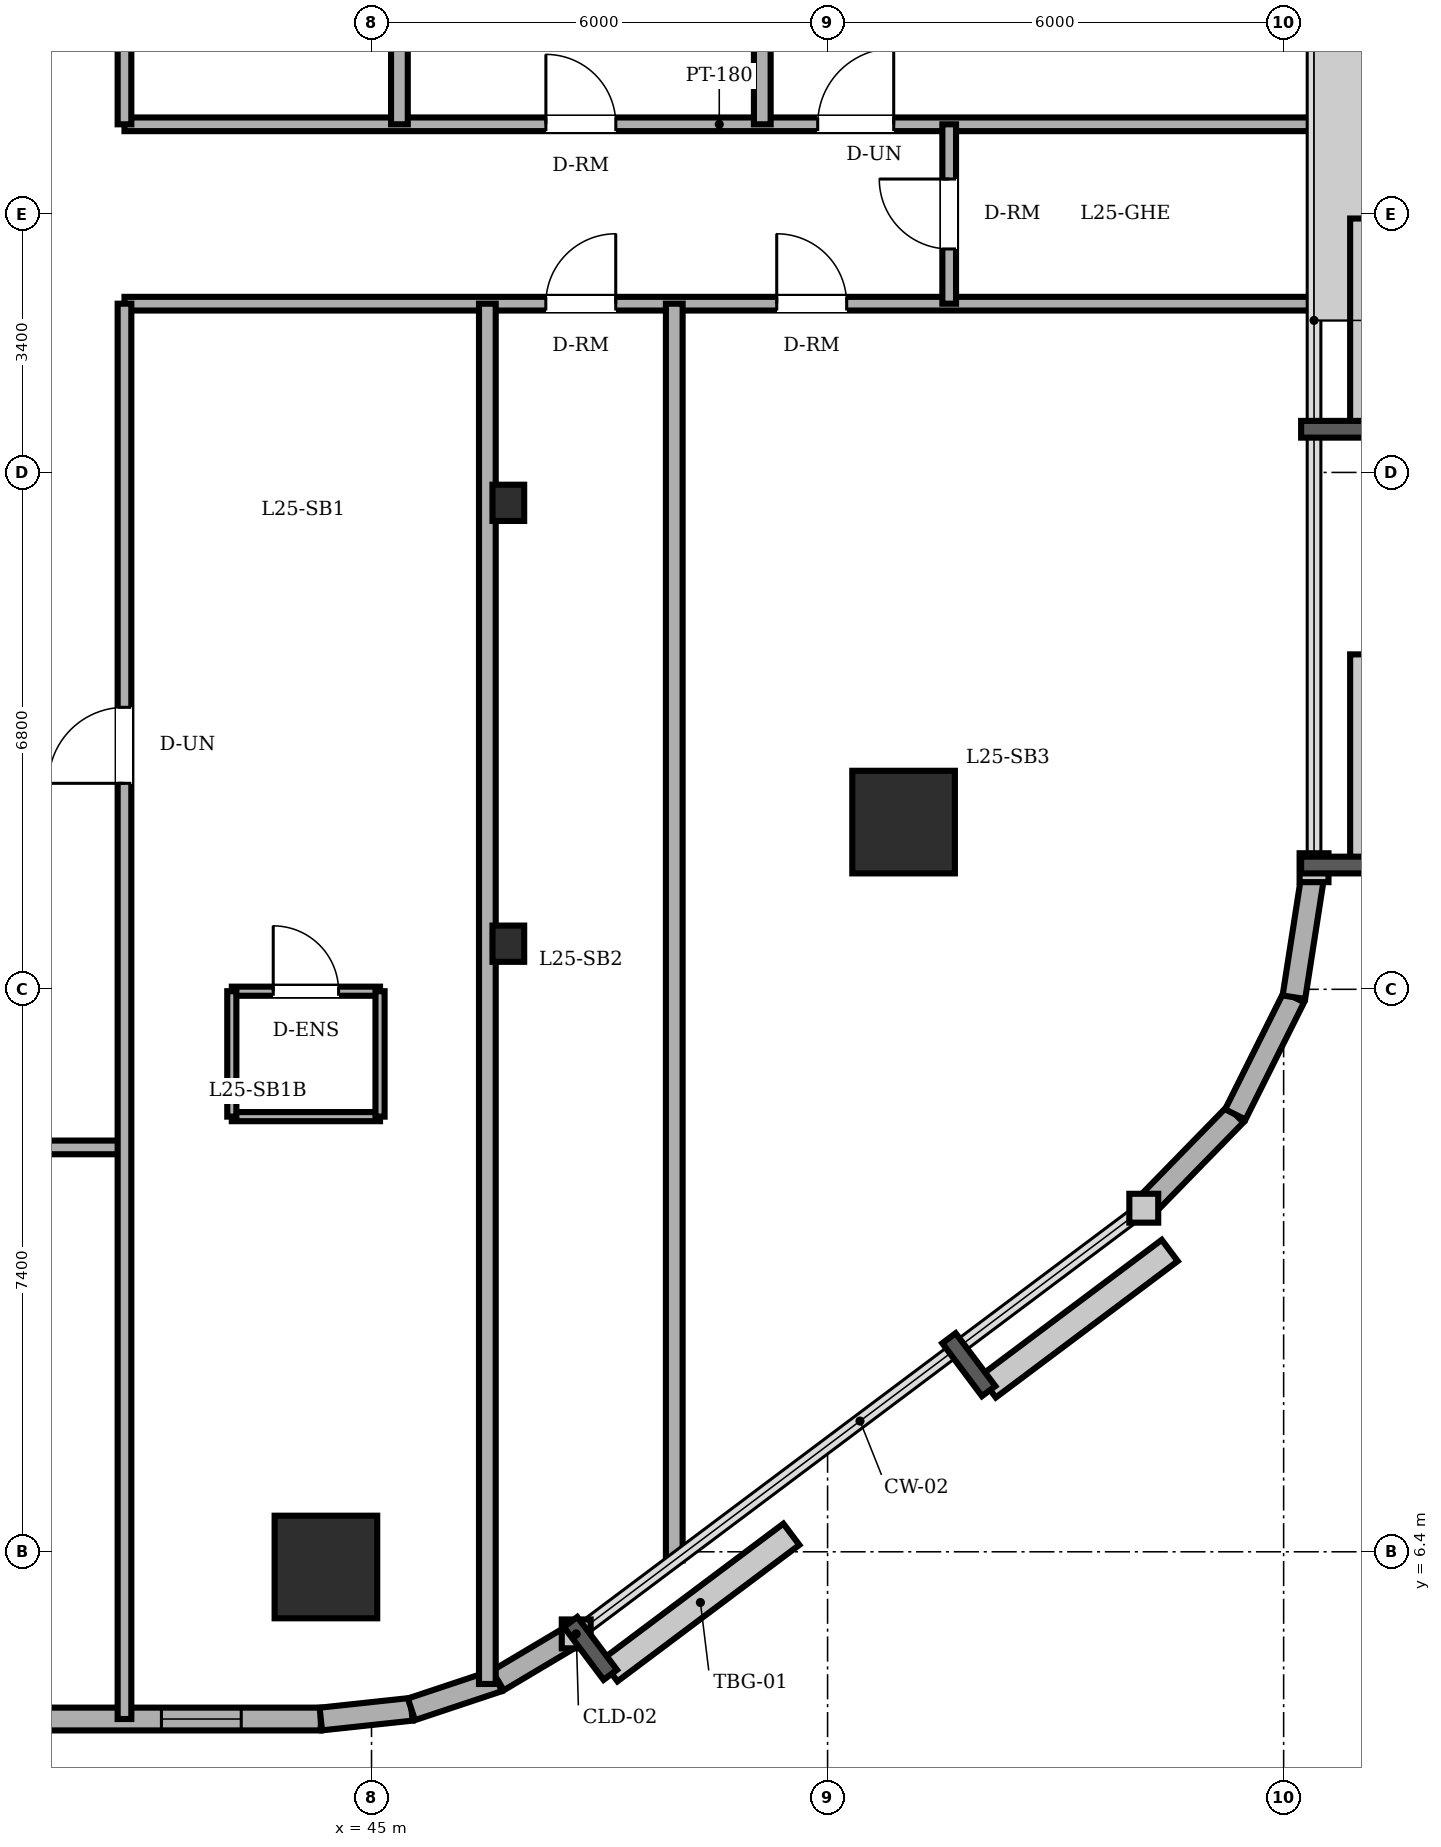
"""IFC4 building model, lengths in metres.
Left out: names, types, materials, properties, quantities, classifications, styles, units other than length and angle.
Written with IfcOpenShell. Run it as: python <this file> out.ifc"""

import sys

from ifc_helpers import new_model, si_unit, direction, frame, frame_2d, origin, origin_2d, place, context, subcontext, project, spatial, rectangle, circle, i_section, extrude, element, fill, save


model = new_model("IFC4")
c1 = context("Model", 3, precision=1e-05, world=origin(), true_north=direction((0.0, 1.0)))
c2 = subcontext(c1, "Body", "Model", "MODEL_VIEW")
j1 = project(units=[si_unit("LENGTHUNIT", "METRE"), si_unit("PLANEANGLEUNIT", "RADIAN")], contexts=[c1])
p1 = place(None, origin())
s1 = spatial("IfcSite", under=j1, at=p1, CompositionType="ELEMENT")
p2 = place(p1, origin())
s2 = spatial("IfcBuilding", under=s1, at=p2, CompositionType="ELEMENT")
p3 = place(p2, frame((0.0, 0.0, 97.1)))
s3 = spatial("IfcBuildingStorey", under=s2, at=p3, CompositionType="ELEMENT", Elevation=97.1)
for number, where, z_axis, x_axis in (
    (1, (44.4, 6.2, 0.0), (0.0, 0.0, 1.0), (1.0, 0.0, 0.0)),
    (2, (52.0, 16.0, 0.0), (0.0, 0.0, 1.0), (1.0, 0.0, 0.0)),
):
    element("IfcColumn", number, at=place(p3, frame(where, z_axis=z_axis, x_axis=x_axis)), inside=s3, PredefinedType="COLUMN", context=c2, shape_type="SweptSolid", body=[
        extrude(circle(Radius=0.675, at=origin_2d()), origin(), (0.0, 0.0, 1.0), 3.6),
    ])
for number, where, z_axis, x_axis in (
    (3, (46.8, 14.4, 0.0), (0.0, 0.0, 1.0), (1.0, 0.0, 0.0)),
    (4, (46.8, 20.2, 0.0), (0.0, 0.0, 1.0), (1.0, 0.0, 0.0)),
):
    element("IfcColumn", number, at=place(p3, frame(where, z_axis=z_axis, x_axis=x_axis)), inside=s3, PredefinedType="COLUMN", context=c2, shape_type="SweptSolid", body=[
        extrude(i_section(OverallWidth=0.417, OverallDepth=0.477, WebThickness=0.036, FlangeThickness=0.057, FilletRadius=0.015, at=origin_2d()), origin(), (0.0, 0.0, 1.0), 3.6),
    ])
p4 = place(p3, frame((14.4, 4.2, 0.0), z_axis=(0.0, 0.0, 1.0), x_axis=(1.0, 0.0, 0.0)))
e5 = element("IfcWall", 5, at=p4, inside=s3, PredefinedType="SOLIDWALL", context=c2, shape_type="SweptSolid", body=[
    extrude(rectangle(XDim=29.933, YDim=0.3, at=frame_2d((14.967, 0.0))), origin(), (0.0, 0.0, 1.0), 3.4),
])
p5 = place(p4, frame((3.85, 0.0, 0.0)))
e6 = element("IfcOpeningElement", 6, at=p5, cuts=e5, PredefinedType="OPENING", context=c2, shape_type="SweptSolid", body=[
    extrude(rectangle(XDim=0.95, YDim=2.2, at=frame_2d((0.475, 1.1))), frame((0.0, 0.16, 0.0), z_axis=(0.0, -1.0, 0.0), x_axis=(1.0, 0.0, 0.0)), (0.0, 0.0, 1.0), 0.32),
])
p6 = place(p4, frame((5.158, 0.0, 0.85)))
e7 = element("IfcOpeningElement", 7, at=p6, cuts=e5, PredefinedType="OPENING", context=c2, shape_type="SweptSolid", body=[
    extrude(rectangle(XDim=1.65, YDim=1.55, at=frame_2d((0.825, 0.775))), frame((0.0, 0.16, 0.0), z_axis=(0.0, -1.0, 0.0), x_axis=(1.0, 0.0, 0.0)), (0.0, 0.0, 1.0), 0.32),
])
p7 = place(p4, frame((9.875, 0.0, 0.85)))
e8 = element("IfcOpeningElement", 8, at=p7, cuts=e5, PredefinedType="OPENING", context=c2, shape_type="SweptSolid", body=[
    extrude(rectangle(XDim=1.65, YDim=1.55, at=frame_2d((0.825, 0.775))), frame((0.0, 0.16, 0.0), z_axis=(0.0, -1.0, 0.0), x_axis=(1.0, 0.0, 0.0)), (0.0, 0.0, 1.0), 0.32),
])
p8 = place(p4, frame((16.692, 0.0, 0.85)))
e9 = element("IfcOpeningElement", 9, at=p8, cuts=e5, PredefinedType="OPENING", context=c2, shape_type="SweptSolid", body=[
    extrude(rectangle(XDim=1.65, YDim=1.55, at=frame_2d((0.825, 0.775))), frame((0.0, 0.16, 0.0), z_axis=(0.0, -1.0, 0.0), x_axis=(1.0, 0.0, 0.0)), (0.0, 0.0, 1.0), 0.32),
])
p9 = place(p4, frame((21.608, 0.0, 0.85)))
e10 = element("IfcOpeningElement", 10, at=p9, cuts=e5, PredefinedType="OPENING", context=c2, shape_type="SweptSolid", body=[
    extrude(rectangle(XDim=1.65, YDim=1.55, at=frame_2d((0.825, 0.775))), frame((0.0, 0.16, 0.0), z_axis=(0.0, -1.0, 0.0), x_axis=(1.0, 0.0, 0.0)), (0.0, 0.0, 1.0), 0.32),
])
p10 = place(p4, frame((27.836, 0.0, 0.85)))
e11 = element("IfcOpeningElement", 11, at=p10, cuts=e5, PredefinedType="OPENING", context=c2, shape_type="SweptSolid", body=[
    extrude(rectangle(XDim=1.05, YDim=1.55, at=frame_2d((0.525, 0.775))), frame((0.0, 0.16, 0.0), z_axis=(0.0, -1.0, 0.0), x_axis=(1.0, 0.0, 0.0)), (0.0, 0.0, 1.0), 0.32),
])
p11 = place(p3, frame((44.333, 4.2, 0.0), z_axis=(0.0, 0.0, 1.0), x_axis=(0.994289103787, 0.106720092254, 0.0)))
e12 = element("IfcWall", 12, at=p11, inside=s3, PredefinedType="SOLIDWALL", context=c2, shape_type="SweptSolid", body=[
    extrude(rectangle(XDim=1.199, YDim=0.3, at=frame_2d((0.599, 0.0))), origin(), (0.0, 0.0, 1.0), 3.4),
])
p12 = place(p3, frame((45.525, 4.328, 0.0), z_axis=(0.0, 0.0, 1.0), x_axis=(0.948744332129, 0.316044604847, 0.0)))
e13 = element("IfcWall", 13, at=p12, inside=s3, PredefinedType="SOLIDWALL", context=c2, shape_type="SweptSolid", body=[
    extrude(rectangle(XDim=1.2, YDim=0.3, at=frame_2d((0.6, 0.0))), origin(), (0.0, 0.0, 1.0), 3.4),
])
p13 = place(p3, frame((46.663, 4.707, 0.0), z_axis=(0.0, 0.0, 1.0), x_axis=(0.859320591642, 0.511437308749, 0.0)))
e14 = element("IfcWall", 14, at=p13, inside=s3, PredefinedType="SOLIDWALL", context=c2, shape_type="SweptSolid", body=[
    extrude(rectangle(XDim=1.199, YDim=0.3, at=frame_2d((0.599, 0.0))), origin(), (0.0, 0.0, 1.0), 3.4),
])
for number, where, z_axis, x_axis in (
    (15, (55.16, 10.92, 0.0), (0.0, 0.0, 1.0), (0.698, 0.716, 0.0)),
    (16, (56.364, 12.154, 0.0), (0.0, 0.0, 1.0), (0.447, 0.894, 0.0)),
):
    element("IfcWall", number, at=place(p3, frame(where, z_axis=z_axis, x_axis=x_axis)), inside=s3, PredefinedType="SOLIDWALL", context=c2, shape_type="SweptSolid", body=[
        extrude(rectangle(XDim=1.724, YDim=0.3, at=frame_2d((0.862, 0.0))), origin(), (0.0, 0.0, 1.0), 3.4),
    ])
p14 = place(p3, frame((57.135, 13.696, 0.0), z_axis=(0.0, 0.0, 1.0), x_axis=(0.153620989032, 0.988129845581, 0.0)))
e17 = element("IfcWall", 17, at=p14, inside=s3, PredefinedType="SOLIDWALL", context=c2, shape_type="SweptSolid", body=[
    extrude(rectangle(XDim=1.724, YDim=0.3, at=frame_2d((0.862, 0.0))), origin(), (0.0, 0.0, 1.0), 3.4),
])
p15 = place(p3, frame((43.162, 13.775, 0.0), z_axis=(0.0, 0.0, 1.0), x_axis=(1.0, 0.0, 0.0)))
e18 = element("IfcWall", 18, at=p15, inside=s3, PredefinedType="PARTITIONING", context=c2, shape_type="SweptSolid", body=[
    extrude(rectangle(XDim=1.95, YDim=0.12, at=frame_2d((0.975, 0.0))), origin(), (0.0, 0.0, 1.0), 3.4),
])
p16 = place(p15, frame((0.545, 0.0, 0.0)))
e19 = element("IfcOpeningElement", 19, at=p16, cuts=e18, PredefinedType="OPENING", context=c2, shape_type="SweptSolid", body=[
    extrude(rectangle(XDim=0.86, YDim=2.1, at=frame_2d((0.43, 1.05))), frame((0.0, 0.07, 0.0), z_axis=(0.0, -1.0, 0.0), x_axis=(1.0, 0.0, 0.0)), (0.0, 0.0, 1.0), 0.14),
])
p17 = place(p3, frame((45.112, 12.125, 0.0), z_axis=(0.0, 0.0, 1.0), x_axis=(-1.0, 0.0, 0.0)))
e20 = element("IfcWall", 20, at=p17, inside=s3, PredefinedType="PARTITIONING", context=c2, shape_type="SweptSolid", body=[
    extrude(rectangle(XDim=1.95, YDim=0.12, at=frame_2d((0.975, 0.0))), origin(), (0.0, 0.0, 1.0), 3.4),
])
for number, where, z_axis, x_axis in (
    (21, (43.162, 13.775, 0.0), (0.0, 0.0, 1.0), (0.0, -1.0, 0.0)),
    (22, (45.112, 12.125, 0.0), (0.0, 0.0, 1.0), (0.0, 1.0, 0.0)),
):
    element("IfcWall", number, at=place(p3, frame(where, z_axis=z_axis, x_axis=x_axis)), inside=s3, PredefinedType="PARTITIONING", context=c2, shape_type="SweptSolid", body=[
        extrude(rectangle(XDim=1.65, YDim=0.12, at=frame_2d((0.825, 0.0))), origin(), (0.0, 0.0, 1.0), 3.4),
    ])
p18 = place(p3, frame((8.8, 11.72, 0.0), z_axis=(0.0, 0.0, 1.0), x_axis=(1.0, 0.0, 0.0)))
e23 = element("IfcWall", 23, at=p18, inside=s3, PredefinedType="PARTITIONING", context=c2, shape_type="SweptSolid", body=[
    extrude(rectangle(XDim=32.95, YDim=0.18, at=frame_2d((16.475, 0.0))), origin(), (0.0, 0.0, 1.0), 3.4),
])
p19 = place(p18, frame((15.84, 0.0, 0.0)))
e24 = element("IfcOpeningElement", 24, at=p19, cuts=e23, PredefinedType="OPENING", context=c2, shape_type="SweptSolid", body=[
    extrude(rectangle(XDim=0.92, YDim=2.1, at=frame_2d((0.46, 1.05))), frame((0.0, 0.1, 0.0), z_axis=(0.0, -1.0, 0.0), x_axis=(1.0, 0.0, 0.0)), (0.0, 0.0, 1.0), 0.2),
])
p20 = place(p18, frame((3.101, 0.0, 0.0)))
e25 = element("IfcOpeningElement", 25, at=p20, cuts=e23, PredefinedType="OPENING", context=c2, shape_type="SweptSolid", body=[
    extrude(rectangle(XDim=0.92, YDim=2.1, at=frame_2d((0.46, 1.05))), frame((0.0, 0.1, 0.0), z_axis=(0.0, -1.0, 0.0), x_axis=(1.0, 0.0, 0.0)), (0.0, 0.0, 1.0), 0.2),
])
p21 = place(p18, frame((9.701, 0.0, 0.0)))
e26 = element("IfcOpeningElement", 26, at=p21, cuts=e23, PredefinedType="OPENING", context=c2, shape_type="SweptSolid", body=[
    extrude(rectangle(XDim=0.92, YDim=2.1, at=frame_2d((0.46, 1.05))), frame((0.0, 0.1, 0.0), z_axis=(0.0, -1.0, 0.0), x_axis=(1.0, 0.0, 0.0)), (0.0, 0.0, 1.0), 0.2),
])
p22 = place(p18, frame((24.855, 0.0, 0.0)))
e27 = element("IfcOpeningElement", 27, at=p22, cuts=e23, PredefinedType="OPENING", context=c2, shape_type="SweptSolid", body=[
    extrude(rectangle(XDim=0.92, YDim=2.1, at=frame_2d((0.46, 1.05))), frame((0.0, 0.1, 0.0), z_axis=(0.0, -1.0, 0.0), x_axis=(1.0, 0.0, 0.0)), (0.0, 0.0, 1.0), 0.2),
])
p23 = place(p3, frame((41.75, 22.82, 0.0), z_axis=(0.0, 0.0, 1.0), x_axis=(1.0, 0.0, 0.0)))
e28 = element("IfcWall", 28, at=p23, inside=s3, PredefinedType="PARTITIONING", context=c2, shape_type="SweptSolid", body=[
    extrude(rectangle(XDim=15.65, YDim=0.18, at=frame_2d((7.825, 0.0))), origin(), (0.0, 0.0, 1.0), 3.4),
])
p24 = place(p23, frame((5.543, 0.0, 0.0)))
e29 = element("IfcOpeningElement", 29, at=p24, cuts=e28, PredefinedType="OPENING", context=c2, shape_type="SweptSolid", body=[
    extrude(rectangle(XDim=0.92, YDim=2.1, at=frame_2d((0.46, 1.05))), frame((0.0, 0.1, 0.0), z_axis=(0.0, -1.0, 0.0), x_axis=(1.0, 0.0, 0.0)), (0.0, 0.0, 1.0), 0.2),
])
p25 = place(p23, frame((8.581, 0.0, 0.0)))
e30 = element("IfcOpeningElement", 30, at=p25, cuts=e28, PredefinedType="OPENING", context=c2, shape_type="SweptSolid", body=[
    extrude(rectangle(XDim=0.92, YDim=2.1, at=frame_2d((0.46, 1.05))), frame((0.0, 0.1, 0.0), z_axis=(0.0, -1.0, 0.0), x_axis=(1.0, 0.0, 0.0)), (0.0, 0.0, 1.0), 0.2),
])
p26 = place(p3, frame((41.75, 25.18, 0.0), z_axis=(0.0, 0.0, 1.0), x_axis=(1.0, 0.0, 0.0)))
e31 = element("IfcWall", 31, at=p26, inside=s3, PredefinedType="PARTITIONING", context=c2, shape_type="SweptSolid", body=[
    extrude(rectangle(XDim=15.65, YDim=0.18, at=frame_2d((7.825, 0.0))), origin(), (0.0, 0.0, 1.0), 3.4),
])
p27 = place(p26, frame((5.544, 0.0, 0.0)))
e32 = element("IfcOpeningElement", 32, at=p27, cuts=e31, PredefinedType="OPENING", context=c2, shape_type="SweptSolid", body=[
    extrude(rectangle(XDim=0.92, YDim=2.1, at=frame_2d((0.46, 1.05))), frame((0.0, 0.1, 0.0), z_axis=(0.0, -1.0, 0.0), x_axis=(1.0, 0.0, 0.0)), (0.0, 0.0, 1.0), 0.2),
])
p28 = place(p26, frame((9.12, 0.0, 0.0)))
e33 = element("IfcOpeningElement", 33, at=p28, cuts=e31, PredefinedType="OPENING", context=c2, shape_type="SweptSolid", body=[
    extrude(rectangle(XDim=1.0, YDim=2.15, at=frame_2d((0.5, 1.075))), frame((0.0, 0.1, 0.0), z_axis=(0.0, -1.0, 0.0), x_axis=(1.0, 0.0, 0.0)), (0.0, 0.0, 1.0), 0.2),
])
p29 = place(p3, frame((41.75, 4.2, 0.0), z_axis=(0.0, 0.0, 1.0), x_axis=(0.0, 1.0, 0.0)))
e34 = element("IfcWall", 34, at=p29, inside=s3, PredefinedType="PARTITIONING", context=c2, shape_type="SweptSolid", body=[
    extrude(rectangle(XDim=18.62, YDim=0.18, at=frame_2d((9.31, 0.0))), origin(), (0.0, 0.0, 1.0), 3.4),
])
p30 = place(p29, frame((12.31, 0.0, 0.0)))
e35 = element("IfcOpeningElement", 35, at=p30, cuts=e34, PredefinedType="OPENING", context=c2, shape_type="SweptSolid", body=[
    extrude(rectangle(XDim=1.0, YDim=2.15, at=frame_2d((0.5, 1.075))), frame((0.0, 0.1, 0.0), z_axis=(0.0, -1.0, 0.0), x_axis=(1.0, 0.0, 0.0)), (0.0, 0.0, 1.0), 0.2),
])
p31 = place(p3, frame((41.75, 25.18, 0.0), z_axis=(0.0, 0.0, 1.0), x_axis=(0.0, 1.0, 0.0)))
e36 = element("IfcWall", 36, at=p31, inside=s3, PredefinedType="PARTITIONING", context=c2, shape_type="SweptSolid", body=[
    extrude(rectangle(XDim=18.62, YDim=0.18, at=frame_2d((9.31, 0.0))), origin(), (0.0, 0.0, 1.0), 3.4),
])
p32 = place(p31, frame((5.31, 0.0, 0.0)))
e37 = element("IfcOpeningElement", 37, at=p32, cuts=e36, PredefinedType="OPENING", context=c2, shape_type="SweptSolid", body=[
    extrude(rectangle(XDim=1.0, YDim=2.15, at=frame_2d((0.5, 1.075))), frame((0.0, 0.1, 0.0), z_axis=(0.0, -1.0, 0.0), x_axis=(1.0, 0.0, 0.0)), (0.0, 0.0, 1.0), 0.2),
])
p33 = place(p3, frame((45.367, 25.18, 0.0), z_axis=(0.0, 0.0, 1.0), x_axis=(0.0, 1.0, 0.0)))
e38 = element("IfcWall", 38, at=p33, inside=s3, PredefinedType="PARTITIONING", context=c2, shape_type="SweptSolid", body=[
    extrude(rectangle(XDim=18.509, YDim=0.22, at=frame_2d((9.254, 0.0))), origin(), (0.0, 0.0, 1.0), 2.882),
])
p34 = place(p3, frame((46.524, 4.661, 0.0), z_axis=(0.0, 0.0, 1.0), x_axis=(0.0, 1.0, 0.0)))
e39 = element("IfcWall", 39, at=p34, inside=s3, PredefinedType="PARTITIONING", context=c2, shape_type="SweptSolid", body=[
    extrude(rectangle(XDim=18.159, YDim=0.22, at=frame_2d((9.08, 0.0))), origin(), (0.0, 0.0, 1.0), 2.882),
])
p35 = place(p3, frame((48.983, 6.287, 0.0), z_axis=(0.0, 0.0, 1.0), x_axis=(0.0, 1.0, 0.0)))
e40 = element("IfcWall", 40, at=p35, inside=s3, PredefinedType="PARTITIONING", context=c2, shape_type="SweptSolid", body=[
    extrude(rectangle(XDim=16.533, YDim=0.22, at=frame_2d((8.267, 0.0))), origin(), (0.0, 0.0, 1.0), 3.4),
])
p36 = place(p3, frame((50.141, 25.18, 0.0), z_axis=(0.0, 0.0, 1.0), x_axis=(0.0, 1.0, 0.0)))
e41 = element("IfcWall", 41, at=p36, inside=s3, PredefinedType="PARTITIONING", context=c2, shape_type="SweptSolid", body=[
    extrude(rectangle(XDim=15.664, YDim=0.22, at=frame_2d((7.832, 0.0))), origin(), (0.0, 0.0, 1.0), 3.4),
])
p37 = place(p3, frame((52.6, 22.82, 0.0), z_axis=(0.0, 0.0, 1.0), x_axis=(0.0, 1.0, 0.0)))
e42 = element("IfcWall", 42, at=p37, inside=s3, PredefinedType="PARTITIONING", context=c2, shape_type="SweptSolid", body=[
    extrude(rectangle(XDim=2.36, YDim=0.18, at=frame_2d((1.18, 0.0))), origin(), (0.0, 0.0, 1.0), 3.4),
])
p38 = place(p37, frame((0.72, 0.0, 0.0)))
e43 = element("IfcOpeningElement", 43, at=p38, cuts=e42, PredefinedType="OPENING", context=c2, shape_type="SweptSolid", body=[
    extrude(rectangle(XDim=0.92, YDim=2.1, at=frame_2d((0.46, 1.05))), frame((0.0, 0.1, 0.0), z_axis=(0.0, -1.0, 0.0), x_axis=(1.0, 0.0, 0.0)), (0.0, 0.0, 1.0), 0.2),
])
p39 = place(p10, origin())
e44 = element("IfcWindow", 44, at=p39, inside=s3, PartitioningType="SINGLE_PANEL", PredefinedType="WINDOW", context=c2, shape_type="SweptSolid", body=[
    extrude(rectangle(XDim=1.05, YDim=1.55, at=frame_2d((0.525, 0.775))), frame((0.0, 0.03, 0.0), z_axis=(0.0, -1.0, 0.0), x_axis=(1.0, 0.0, 0.0)), (0.0, 0.0, 1.0), 0.06),
])
fill(e11, e44)
p40 = place(p16, origin())
e45 = element("IfcDoor", 45, at=p40, inside=s3, OperationType="SINGLE_SWING_LEFT", PredefinedType="DOOR", context=c2, shape_type="SweptSolid", body=[
    extrude(rectangle(XDim=0.86, YDim=2.1, at=frame_2d((0.43, 1.05))), frame((0.0, 0.025, 0.0), z_axis=(0.0, -1.0, 0.0), x_axis=(1.0, 0.0, 0.0)), (0.0, 0.0, 1.0), 0.05),
])
fill(e19, e45)
p41 = place(p27, origin())
e46 = element("IfcDoor", 46, at=p41, inside=s3, OperationType="SINGLE_SWING_LEFT", PredefinedType="DOOR", context=c2, shape_type="SweptSolid", body=[
    extrude(rectangle(XDim=0.92, YDim=2.1, at=frame_2d((0.46, 1.05))), frame((0.0, 0.025, 0.0), z_axis=(0.0, -1.0, 0.0), x_axis=(1.0, 0.0, 0.0)), (0.0, 0.0, 1.0), 0.05),
])
fill(e32, e46)
p42 = place(p28, origin())
e47 = element("IfcDoor", 47, at=p42, inside=s3, OperationType="SINGLE_SWING_RIGHT", PredefinedType="DOOR", context=c2, shape_type="SweptSolid", body=[
    extrude(rectangle(XDim=1.0, YDim=2.15, at=frame_2d((0.5, 1.075))), frame((0.0, 0.025, 0.0), z_axis=(0.0, -1.0, 0.0), x_axis=(1.0, 0.0, 0.0)), (0.0, 0.0, 1.0), 0.05),
])
fill(e33, e47)
p43 = place(p30, origin())
e48 = element("IfcDoor", 48, at=p43, inside=s3, OperationType="SINGLE_SWING_LEFT", PredefinedType="DOOR", context=c2, shape_type="SweptSolid", body=[
    extrude(rectangle(XDim=1.0, YDim=2.15, at=frame_2d((0.5, 1.075))), frame((0.0, 0.025, 0.0), z_axis=(0.0, -1.0, 0.0), x_axis=(1.0, 0.0, 0.0)), (0.0, 0.0, 1.0), 0.05),
])
fill(e35, e48)
p44 = place(p24, origin())
e49 = element("IfcDoor", 49, at=p44, inside=s3, OperationType="SINGLE_SWING_RIGHT", PredefinedType="DOOR", context=c2, shape_type="SweptSolid", body=[
    extrude(rectangle(XDim=0.92, YDim=2.1, at=frame_2d((0.46, 1.05))), frame((0.0, 0.025, 0.0), z_axis=(0.0, -1.0, 0.0), x_axis=(1.0, 0.0, 0.0)), (0.0, 0.0, 1.0), 0.05),
])
fill(e29, e49)
p45 = place(p25, origin())
e50 = element("IfcDoor", 50, at=p45, inside=s3, OperationType="SINGLE_SWING_LEFT", PredefinedType="DOOR", context=c2, shape_type="SweptSolid", body=[
    extrude(rectangle(XDim=0.92, YDim=2.1, at=frame_2d((0.46, 1.05))), frame((0.0, 0.025, 0.0), z_axis=(0.0, -1.0, 0.0), x_axis=(1.0, 0.0, 0.0)), (0.0, 0.0, 1.0), 0.05),
])
fill(e30, e50)
p46 = place(p38, origin())
e51 = element("IfcDoor", 51, at=p46, inside=s3, OperationType="SINGLE_SWING_RIGHT", PredefinedType="DOOR", context=c2, shape_type="SweptSolid", body=[
    extrude(rectangle(XDim=0.92, YDim=2.1, at=frame_2d((0.46, 1.05))), frame((0.0, 0.025, 0.0), z_axis=(0.0, -1.0, 0.0), x_axis=(1.0, 0.0, 0.0)), (0.0, 0.0, 1.0), 0.05),
])
fill(e43, e51)
save(model, sys.argv[1])
